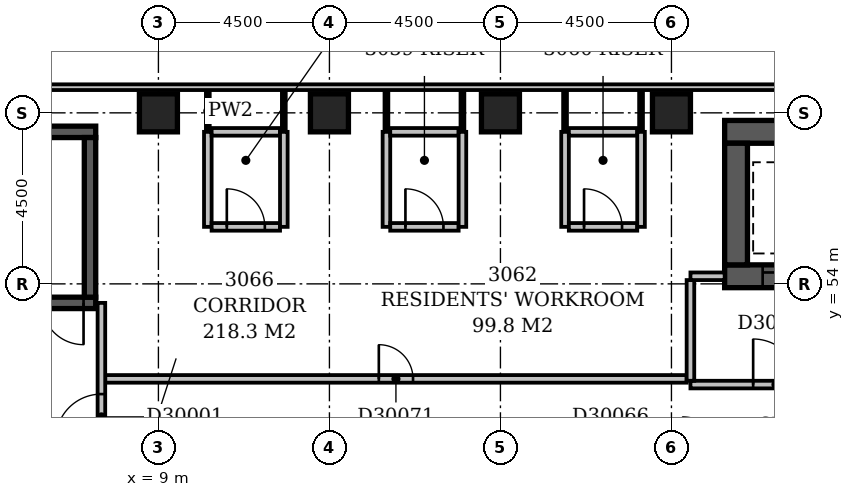
"""IFC4 building model, lengths in metres.
Left out: names, types, materials, properties, quantities, classifications, styles, units other than length and angle.
Written with IfcOpenShell. Run it as: python <this file> out.ifc"""

import sys

from ifc_helpers import new_model, si_unit, direction, frame, frame_2d, origin, origin_2d, place, context, subcontext, project, spatial, rectangle, extrude, element, fill, save


model = new_model("IFC4")
c1 = context("Model", 3, precision=1e-05, world=origin(), true_north=direction((0.0, 1.0)))
c2 = subcontext(c1, "Body", "Model", "MODEL_VIEW")
j1 = project(units=[si_unit("LENGTHUNIT", "METRE"), si_unit("PLANEANGLEUNIT", "RADIAN")], contexts=[c1])
p1 = place(None, origin())
s1 = spatial("IfcSite", under=j1, at=p1, CompositionType="ELEMENT")
p2 = place(p1, origin())
s2 = spatial("IfcBuilding", under=s1, at=p2, CompositionType="ELEMENT")
p3 = place(p2, frame((0.0, 0.0, 123.2)))
s3 = spatial("IfcBuildingStorey", under=s2, at=p3, CompositionType="ELEMENT", Elevation=123.2)
p4 = place(p3, frame((0.35, 53.5, -0.3), z_axis=(0.0, 0.0, 1.0), x_axis=(1.0, 0.0, 0.0)))
e1 = element("IfcWall", 1, at=p4, inside=s3, PredefinedType="SHEAR", context=c2, shape_type="SweptSolid", body=[
    extrude(rectangle(XDim=7.0, YDim=0.3, at=frame_2d((3.5, 0.0))), origin(), (0.0, 0.0, 1.0), 3.6),
])
p5 = place(p4, frame((5.58, 0.0, 0.3)))
e2 = element("IfcOpeningElement", 2, at=p5, cuts=e1, PredefinedType="OPENING", context=c2, shape_type="SweptSolid", body=[
    extrude(rectangle(XDim=1.1, YDim=2.1, at=frame_2d((0.55, 1.05))), frame((0.0, 0.162, 0.0), z_axis=(0.0, -1.0, 0.0), x_axis=(1.0, 0.0, 0.0)), (0.0, 0.0, 1.0), 0.324),
])
p6 = place(p3, frame((0.35, 58.0, -0.3), z_axis=(0.0, 0.0, 1.0), x_axis=(1.0, 0.0, 0.0)))
e3 = element("IfcWall", 3, at=p6, inside=s3, PredefinedType="SHEAR", context=c2, shape_type="SweptSolid", body=[
    extrude(rectangle(XDim=7.0, YDim=0.3, at=frame_2d((3.5, 0.0))), origin(), (0.0, 0.0, 1.0), 3.6),
])
p7 = place(p3, frame((7.2, 53.65, -0.3), z_axis=(0.0, 0.0, 1.0), x_axis=(0.0, 1.0, 0.0)))
e4 = element("IfcWall", 4, at=p7, inside=s3, PredefinedType="SHEAR", context=c2, shape_type="SweptSolid", body=[
    extrude(rectangle(XDim=4.2, YDim=0.3, at=frame_2d((2.1, 0.0))), origin(), (0.0, 0.0, 1.0), 3.6),
])
p8 = place(p3, frame((23.9, 54.2, -0.3), z_axis=(0.0, 0.0, 1.0), x_axis=(1.0, 0.0, 0.0)))
e5 = element("IfcWall", 5, at=p8, inside=s3, PredefinedType="SHEAR", context=c2, shape_type="SweptSolid", body=[
    extrude(rectangle(XDim=3.1, YDim=0.6, at=frame_2d((1.55, 0.0))), origin(), (0.0, 0.0, 1.0), 3.6),
])
p9 = place(p8, frame((1.0, 0.0, 0.3)))
e6 = element("IfcOpeningElement", 6, at=p9, cuts=e5, PredefinedType="OPENING", context=c2, shape_type="SweptSolid", body=[
    extrude(rectangle(XDim=1.1, YDim=2.1, at=frame_2d((0.55, 1.05))), frame((0.0, 0.312, 0.0), z_axis=(0.0, -1.0, 0.0), x_axis=(1.0, 0.0, 0.0)), (0.0, 0.0, 1.0), 0.624),
])
p10 = place(p3, frame((23.9, 58.0, -0.3), z_axis=(0.0, 0.0, 1.0), x_axis=(1.0, 0.0, 0.0)))
e7 = element("IfcWall", 7, at=p10, inside=s3, PredefinedType="SHEAR", context=c2, shape_type="SweptSolid", body=[
    extrude(rectangle(XDim=3.1, YDim=0.6, at=frame_2d((1.55, 0.0))), origin(), (0.0, 0.0, 1.0), 3.6),
])
p11 = place(p3, frame((24.2, 54.5, -0.3), z_axis=(0.0, 0.0, 1.0), x_axis=(0.0, 1.0, 0.0)))
e8 = element("IfcWall", 8, at=p11, inside=s3, PredefinedType="SHEAR", context=c2, shape_type="SweptSolid", body=[
    extrude(rectangle(XDim=3.2, YDim=0.6, at=frame_2d((1.6, 0.0))), origin(), (0.0, 0.0, 1.0), 3.6),
])
for number, where, z_axis, x_axis in (
    (9, (9.0, 58.5, -0.3), (0.0, 0.0, 1.0), (1.0, 0.0, 0.0)),
    (10, (13.5, 58.5, -0.3), (0.0, 0.0, 1.0), (1.0, 0.0, 0.0)),
    (11, (18.0, 58.5, -0.3), (0.0, 0.0, 1.0), (1.0, 0.0, 0.0)),
    (12, (22.5, 58.5, -0.3), (0.0, 0.0, 1.0), (1.0, 0.0, 0.0)),
):
    element("IfcColumn", number, at=place(p3, frame(where, z_axis=z_axis, x_axis=x_axis)), inside=s3, PredefinedType="COLUMN", context=c2, shape_type="SweptSolid", body=[
        extrude(rectangle(XDim=1.0, YDim=1.0, at=origin_2d()), origin(), (0.0, 0.0, 1.0), 3.6),
    ])
p12 = place(p3, frame((68.1, 59.175, 0.0), z_axis=(0.0, 0.0, 1.0), x_axis=(-1.0, 0.0, 0.0)))
e13 = element("IfcWall", 13, at=p12, inside=s3, PredefinedType="STANDARD", context=c2, shape_type="SweptSolid", body=[
    extrude(rectangle(XDim=68.85, YDim=0.15, at=frame_2d((34.425, 0.0))), origin(), (0.0, 0.0, 1.0), 2.7),
])
p13 = place(p12, frame((1.65, 0.0, 0.6)))
e14 = element("IfcOpeningElement", 14, at=p13, cuts=e13, PredefinedType="OPENING", context=c2, shape_type="SweptSolid", body=[
    extrude(rectangle(XDim=2.4, YDim=1.8, at=frame_2d((1.2, 0.9))), frame((0.0, 0.087, 0.0), z_axis=(0.0, -1.0, 0.0), x_axis=(1.0, 0.0, 0.0)), (0.0, 0.0, 1.0), 0.174),
])
p14 = place(p12, frame((6.15, 0.0, 0.6)))
e15 = element("IfcOpeningElement", 15, at=p14, cuts=e13, PredefinedType="OPENING", context=c2, shape_type="SweptSolid", body=[
    extrude(rectangle(XDim=2.4, YDim=1.8, at=frame_2d((1.2, 0.9))), frame((0.0, 0.087, 0.0), z_axis=(0.0, -1.0, 0.0), x_axis=(1.0, 0.0, 0.0)), (0.0, 0.0, 1.0), 0.174),
])
p15 = place(p12, frame((14.86, 0.0, 0.6)))
e16 = element("IfcOpeningElement", 16, at=p15, cuts=e13, PredefinedType="OPENING", context=c2, shape_type="SweptSolid", body=[
    extrude(rectangle(XDim=1.8, YDim=1.8, at=frame_2d((0.9, 0.9))), frame((0.0, 0.087, 0.0), z_axis=(0.0, -1.0, 0.0), x_axis=(1.0, 0.0, 0.0)), (0.0, 0.0, 1.0), 0.174),
])
p16 = place(p12, frame((19.65, 0.0, 0.6)))
e17 = element("IfcOpeningElement", 17, at=p16, cuts=e13, PredefinedType="OPENING", context=c2, shape_type="SweptSolid", body=[
    extrude(rectangle(XDim=2.4, YDim=1.8, at=frame_2d((1.2, 0.9))), frame((0.0, 0.087, 0.0), z_axis=(0.0, -1.0, 0.0), x_axis=(1.0, 0.0, 0.0)), (0.0, 0.0, 1.0), 0.174),
])
p17 = place(p12, frame((38.54, 0.0, 0.6)))
e18 = element("IfcOpeningElement", 18, at=p17, cuts=e13, PredefinedType="OPENING", context=c2, shape_type="SweptSolid", body=[
    extrude(rectangle(XDim=1.8, YDim=1.8, at=frame_2d((0.9, 0.9))), frame((0.0, 0.087, 0.0), z_axis=(0.0, -1.0, 0.0), x_axis=(1.0, 0.0, 0.0)), (0.0, 0.0, 1.0), 0.174),
])
p18 = place(p3, frame((23.0, 51.35, 0.0), z_axis=(0.0, 0.0, 1.0), x_axis=(1.0, 0.0, 0.0)))
e19 = element("IfcWall", 19, at=p18, inside=s3, PredefinedType="PARTITIONING", context=c2, shape_type="SweptSolid", body=[
    extrude(rectangle(XDim=4.8, YDim=0.2, at=frame_2d((2.4, 0.0))), origin(), (0.0, 0.0, 1.0), 3.3),
])
p19 = place(p18, frame((1.65, 0.0, 0.0)))
e20 = element("IfcOpeningElement", 20, at=p19, cuts=e19, PredefinedType="OPENING", context=c2, shape_type="SweptSolid", body=[
    extrude(rectangle(XDim=1.2, YDim=2.1, at=frame_2d((0.6, 1.05))), frame((0.0, 0.112, 0.0), z_axis=(0.0, -1.0, 0.0), x_axis=(1.0, 0.0, 0.0)), (0.0, 0.0, 1.0), 0.224),
])
p20 = place(p3, frame((23.0, 54.2, 0.0), z_axis=(0.0, 0.0, 1.0), x_axis=(1.0, 0.0, 0.0)))
e21 = element("IfcWall", 21, at=p20, inside=s3, PredefinedType="PARTITIONING", context=c2, shape_type="SweptSolid", body=[
    extrude(rectangle(XDim=0.9, YDim=0.2, at=frame_2d((0.45, 0.0))), origin(), (0.0, 0.0, 1.0), 3.3),
])
p21 = place(p3, frame((23.0, 51.45, 0.0), z_axis=(0.0, 0.0, 1.0), x_axis=(0.0, 1.0, 0.0)))
e22 = element("IfcWall", 22, at=p21, inside=s3, PredefinedType="PARTITIONING", context=c2, shape_type="SweptSolid", body=[
    extrude(rectangle(XDim=2.65, YDim=0.2, at=frame_2d((1.325, 0.0))), origin(), (0.0, 0.0, 1.0), 3.3),
])
p22 = place(p3, frame((7.5, 49.6, 0.0), z_axis=(0.0, 0.0, 1.0), x_axis=(0.0, 1.0, 0.0)))
e23 = element("IfcWall", 23, at=p22, inside=s3, PredefinedType="PARTITIONING", context=c2, shape_type="SweptSolid", body=[
    extrude(rectangle(XDim=3.9, YDim=0.2, at=frame_2d((1.95, 0.0))), origin(), (0.0, 0.0, 1.0), 3.3),
])
p23 = place(p22, frame((0.3, 0.0, 0.0)))
e24 = element("IfcOpeningElement", 24, at=p23, cuts=e23, PredefinedType="OPENING", context=c2, shape_type="SweptSolid", body=[
    extrude(rectangle(XDim=1.2, YDim=2.1, at=frame_2d((0.6, 1.05))), frame((0.0, 0.112, 0.0), z_axis=(0.0, -1.0, 0.0), x_axis=(1.0, 0.0, 0.0)), (0.0, 0.0, 1.0), 0.224),
])
p24 = place(p3, frame((7.6, 51.5, 0.0), z_axis=(0.0, 0.0, 1.0), x_axis=(1.0, 0.0, 0.0)))
e25 = element("IfcWall", 25, at=p24, inside=s3, PredefinedType="PARTITIONING", context=c2, shape_type="SweptSolid", body=[
    extrude(rectangle(XDim=15.3, YDim=0.2, at=frame_2d((7.65, 0.0))), origin(), (0.0, 0.0, 1.0), 3.3),
])
p25 = place(p24, frame((7.2, 0.0, 0.0)))
e26 = element("IfcOpeningElement", 26, at=p25, cuts=e25, PredefinedType="OPENING", context=c2, shape_type="SweptSolid", body=[
    extrude(rectangle(XDim=0.9, YDim=2.1, at=frame_2d((0.45, 1.05))), frame((0.0, 0.112, 0.0), z_axis=(0.0, -1.0, 0.0), x_axis=(1.0, 0.0, 0.0)), (0.0, 0.0, 1.0), 0.224),
])
p26 = place(p3, frame((10.3, 55.5, 0.0), z_axis=(0.0, 0.0, 1.0), x_axis=(0.0, 1.0, 0.0)))
e27 = element("IfcWall", 27, at=p26, inside=s3, PredefinedType="PARTITIONING", context=c2, shape_type="SweptSolid", body=[
    extrude(rectangle(XDim=2.5, YDim=0.2, at=frame_2d((1.25, 0.0))), origin(), (0.0, 0.0, 1.0), 3.3),
])
p27 = place(p3, frame((10.4, 55.5, 0.0), z_axis=(0.0, 0.0, 1.0), x_axis=(1.0, 0.0, 0.0)))
e28 = element("IfcWall", 28, at=p27, inside=s3, PredefinedType="PARTITIONING", context=c2, shape_type="SweptSolid", body=[
    extrude(rectangle(XDim=1.8, YDim=0.2, at=frame_2d((0.9, 0.0))), origin(), (0.0, 0.0, 1.0), 3.3),
])
p28 = place(p27, frame((0.4, 0.0, 0.0)))
e29 = element("IfcOpeningElement", 29, at=p28, cuts=e28, PredefinedType="OPENING", context=c2, shape_type="SweptSolid", body=[
    extrude(rectangle(XDim=1.0, YDim=2.1, at=frame_2d((0.5, 1.05))), frame((0.0, 0.112, 0.0), z_axis=(0.0, -1.0, 0.0), x_axis=(1.0, 0.0, 0.0)), (0.0, 0.0, 1.0), 0.224),
])
for number, where, z_axis, x_axis in (
    (30, (12.3, 55.5, 0.0), (0.0, 0.0, 1.0), (0.0, 1.0, 0.0)),
    (31, (15.0, 55.5, 0.0), (0.0, 0.0, 1.0), (0.0, 1.0, 0.0)),
):
    element("IfcWall", number, at=place(p3, frame(where, z_axis=z_axis, x_axis=x_axis)), inside=s3, PredefinedType="PARTITIONING", context=c2, shape_type="SweptSolid", body=[
        extrude(rectangle(XDim=2.5, YDim=0.2, at=frame_2d((1.25, 0.0))), origin(), (0.0, 0.0, 1.0), 3.3),
    ])
p29 = place(p3, frame((15.1, 55.5, 0.0), z_axis=(0.0, 0.0, 1.0), x_axis=(1.0, 0.0, 0.0)))
e32 = element("IfcWall", 32, at=p29, inside=s3, PredefinedType="PARTITIONING", context=c2, shape_type="SweptSolid", body=[
    extrude(rectangle(XDim=1.8, YDim=0.2, at=frame_2d((0.9, 0.0))), origin(), (0.0, 0.0, 1.0), 3.3),
])
p30 = place(p29, frame((0.4, 0.0, 0.0)))
e33 = element("IfcOpeningElement", 33, at=p30, cuts=e32, PredefinedType="OPENING", context=c2, shape_type="SweptSolid", body=[
    extrude(rectangle(XDim=1.0, YDim=2.1, at=frame_2d((0.5, 1.05))), frame((0.0, 0.112, 0.0), z_axis=(0.0, -1.0, 0.0), x_axis=(1.0, 0.0, 0.0)), (0.0, 0.0, 1.0), 0.224),
])
for number, where, z_axis, x_axis in (
    (34, (17.0, 55.5, 0.0), (0.0, 0.0, 1.0), (0.0, 1.0, 0.0)),
    (35, (19.7, 55.5, 0.0), (0.0, 0.0, 1.0), (0.0, 1.0, 0.0)),
):
    element("IfcWall", number, at=place(p3, frame(where, z_axis=z_axis, x_axis=x_axis)), inside=s3, PredefinedType="PARTITIONING", context=c2, shape_type="SweptSolid", body=[
        extrude(rectangle(XDim=2.5, YDim=0.2, at=frame_2d((1.25, 0.0))), origin(), (0.0, 0.0, 1.0), 3.3),
    ])
p31 = place(p3, frame((19.8, 55.5, 0.0), z_axis=(0.0, 0.0, 1.0), x_axis=(1.0, 0.0, 0.0)))
e36 = element("IfcWall", 36, at=p31, inside=s3, PredefinedType="PARTITIONING", context=c2, shape_type="SweptSolid", body=[
    extrude(rectangle(XDim=1.8, YDim=0.2, at=frame_2d((0.9, 0.0))), origin(), (0.0, 0.0, 1.0), 3.3),
])
p32 = place(p31, frame((0.4, 0.0, 0.0)))
e37 = element("IfcOpeningElement", 37, at=p32, cuts=e36, PredefinedType="OPENING", context=c2, shape_type="SweptSolid", body=[
    extrude(rectangle(XDim=1.0, YDim=2.1, at=frame_2d((0.5, 1.05))), frame((0.0, 0.112, 0.0), z_axis=(0.0, -1.0, 0.0), x_axis=(1.0, 0.0, 0.0)), (0.0, 0.0, 1.0), 0.224),
])
p33 = place(p3, frame((21.7, 55.5, 0.0), z_axis=(0.0, 0.0, 1.0), x_axis=(0.0, 1.0, 0.0)))
e38 = element("IfcWall", 38, at=p33, inside=s3, PredefinedType="PARTITIONING", context=c2, shape_type="SweptSolid", body=[
    extrude(rectangle(XDim=2.5, YDim=0.2, at=frame_2d((1.25, 0.0))), origin(), (0.0, 0.0, 1.0), 3.3),
])
p34 = place(p3, frame((10.3, 58.0, 0.0), z_axis=(0.0, 0.0, 1.0), x_axis=(0.0, 1.0, 0.0)))
e39 = element("IfcWall", 39, at=p34, inside=s3, PredefinedType="PARTITIONING", context=c2, shape_type="SweptSolid", body=[
    extrude(rectangle(XDim=1.1, YDim=0.1, at=frame_2d((0.55, 0.0))), origin(), (0.0, 0.0, 1.0), 3.3),
])
p35 = place(p3, frame((10.4, 58.0, 0.0), z_axis=(0.0, 0.0, 1.0), x_axis=(1.0, 0.0, 0.0)))
e40 = element("IfcWall", 40, at=p35, inside=s3, PredefinedType="PARTITIONING", context=c2, shape_type="SweptSolid", body=[
    extrude(rectangle(XDim=1.8, YDim=0.2, at=frame_2d((0.9, 0.0))), origin(), (0.0, 0.0, 1.0), 3.3),
])
for number, where, z_axis, x_axis in (
    (41, (12.3, 58.0, 0.0), (0.0, 0.0, 1.0), (0.0, 1.0, 0.0)),
    (42, (15.0, 58.0, 0.0), (0.0, 0.0, 1.0), (0.0, 1.0, 0.0)),
):
    element("IfcWall", number, at=place(p3, frame(where, z_axis=z_axis, x_axis=x_axis)), inside=s3, PredefinedType="PARTITIONING", context=c2, shape_type="SweptSolid", body=[
        extrude(rectangle(XDim=1.1, YDim=0.1, at=frame_2d((0.55, 0.0))), origin(), (0.0, 0.0, 1.0), 3.3),
    ])
p36 = place(p3, frame((15.1, 58.0, 0.0), z_axis=(0.0, 0.0, 1.0), x_axis=(1.0, 0.0, 0.0)))
e43 = element("IfcWall", 43, at=p36, inside=s3, PredefinedType="PARTITIONING", context=c2, shape_type="SweptSolid", body=[
    extrude(rectangle(XDim=1.8, YDim=0.2, at=frame_2d((0.9, 0.0))), origin(), (0.0, 0.0, 1.0), 3.3),
])
for number, where, z_axis, x_axis in (
    (44, (17.0, 58.0, 0.0), (0.0, 0.0, 1.0), (0.0, 1.0, 0.0)),
    (45, (19.7, 58.0, 0.0), (0.0, 0.0, 1.0), (0.0, 1.0, 0.0)),
):
    element("IfcWall", number, at=place(p3, frame(where, z_axis=z_axis, x_axis=x_axis)), inside=s3, PredefinedType="PARTITIONING", context=c2, shape_type="SweptSolid", body=[
        extrude(rectangle(XDim=1.1, YDim=0.1, at=frame_2d((0.55, 0.0))), origin(), (0.0, 0.0, 1.0), 3.3),
    ])
p37 = place(p3, frame((19.8, 58.0, 0.0), z_axis=(0.0, 0.0, 1.0), x_axis=(1.0, 0.0, 0.0)))
e46 = element("IfcWall", 46, at=p37, inside=s3, PredefinedType="PARTITIONING", context=c2, shape_type="SweptSolid", body=[
    extrude(rectangle(XDim=1.8, YDim=0.2, at=frame_2d((0.9, 0.0))), origin(), (0.0, 0.0, 1.0), 3.3),
])
p38 = place(p3, frame((21.7, 58.0, 0.0), z_axis=(0.0, 0.0, 1.0), x_axis=(0.0, 1.0, 0.0)))
e47 = element("IfcWall", 47, at=p38, inside=s3, PredefinedType="PARTITIONING", context=c2, shape_type="SweptSolid", body=[
    extrude(rectangle(XDim=1.1, YDim=0.1, at=frame_2d((0.55, 0.0))), origin(), (0.0, 0.0, 1.0), 3.3),
])
p39 = place(p23, origin())
e48 = element("IfcDoor", 48, at=p39, inside=s3, OperationType="SINGLE_SWING_LEFT", PredefinedType="DOOR", context=c2, shape_type="SweptSolid", body=[
    extrude(rectangle(XDim=1.2, YDim=2.1, at=frame_2d((0.6, 1.05))), frame((0.0, 0.025, 0.0), z_axis=(0.0, -1.0, 0.0), x_axis=(1.0, 0.0, 0.0)), (0.0, 0.0, 1.0), 0.05),
])
fill(e24, e48)
p40 = place(p19, origin())
e49 = element("IfcDoor", 49, at=p40, inside=s3, OperationType="SINGLE_SWING_LEFT", PredefinedType="DOOR", context=c2, shape_type="SweptSolid", body=[
    extrude(rectangle(XDim=1.2, YDim=2.1, at=frame_2d((0.6, 1.05))), frame((0.0, 0.025, 0.0), z_axis=(0.0, -1.0, 0.0), x_axis=(1.0, 0.0, 0.0)), (0.0, 0.0, 1.0), 0.05),
])
fill(e20, e49)
p41 = place(p9, origin())
e50 = element("IfcDoor", 50, at=p41, inside=s3, OperationType="SLIDING_TO_LEFT", PredefinedType="DOOR", context=c2, shape_type="SweptSolid", body=[
    extrude(rectangle(XDim=1.1, YDim=2.1, at=frame_2d((0.55, 1.05))), frame((0.0, 0.025, 0.0), z_axis=(0.0, -1.0, 0.0), x_axis=(1.0, 0.0, 0.0)), (0.0, 0.0, 1.0), 0.05),
])
fill(e6, e50)
p42 = place(p5, origin())
e51 = element("IfcDoor", 51, at=p42, inside=s3, OperationType="SINGLE_SWING_RIGHT", PredefinedType="DOOR", context=c2, shape_type="SweptSolid", body=[
    extrude(rectangle(XDim=1.1, YDim=2.1, at=frame_2d((0.55, 1.05))), frame((0.0, 0.025, 0.0), z_axis=(0.0, -1.0, 0.0), x_axis=(1.0, 0.0, 0.0)), (0.0, 0.0, 1.0), 0.05),
])
fill(e2, e51)
p43 = place(p25, origin())
e52 = element("IfcDoor", 52, at=p43, inside=s3, OperationType="SINGLE_SWING_LEFT", PredefinedType="DOOR", context=c2, shape_type="SweptSolid", body=[
    extrude(rectangle(XDim=0.9, YDim=2.1, at=frame_2d((0.45, 1.05))), frame((0.0, 0.025, 0.0), z_axis=(0.0, -1.0, 0.0), x_axis=(1.0, 0.0, 0.0)), (0.0, 0.0, 1.0), 0.05),
])
fill(e26, e52)
p44 = place(p28, origin())
e53 = element("IfcDoor", 53, at=p44, inside=s3, OperationType="SINGLE_SWING_LEFT", PredefinedType="DOOR", context=c2, shape_type="SweptSolid", body=[
    extrude(rectangle(XDim=1.0, YDim=2.1, at=frame_2d((0.5, 1.05))), frame((0.0, 0.025, 0.0), z_axis=(0.0, -1.0, 0.0), x_axis=(1.0, 0.0, 0.0)), (0.0, 0.0, 1.0), 0.05),
])
fill(e29, e53)
p45 = place(p30, origin())
e54 = element("IfcDoor", 54, at=p45, inside=s3, OperationType="SINGLE_SWING_LEFT", PredefinedType="DOOR", context=c2, shape_type="SweptSolid", body=[
    extrude(rectangle(XDim=1.0, YDim=2.1, at=frame_2d((0.5, 1.05))), frame((0.0, 0.025, 0.0), z_axis=(0.0, -1.0, 0.0), x_axis=(1.0, 0.0, 0.0)), (0.0, 0.0, 1.0), 0.05),
])
fill(e33, e54)
p46 = place(p32, origin())
e55 = element("IfcDoor", 55, at=p46, inside=s3, OperationType="SINGLE_SWING_LEFT", PredefinedType="DOOR", context=c2, shape_type="SweptSolid", body=[
    extrude(rectangle(XDim=1.0, YDim=2.1, at=frame_2d((0.5, 1.05))), frame((0.0, 0.025, 0.0), z_axis=(0.0, -1.0, 0.0), x_axis=(1.0, 0.0, 0.0)), (0.0, 0.0, 1.0), 0.05),
])
fill(e37, e55)
save(model, sys.argv[1])
